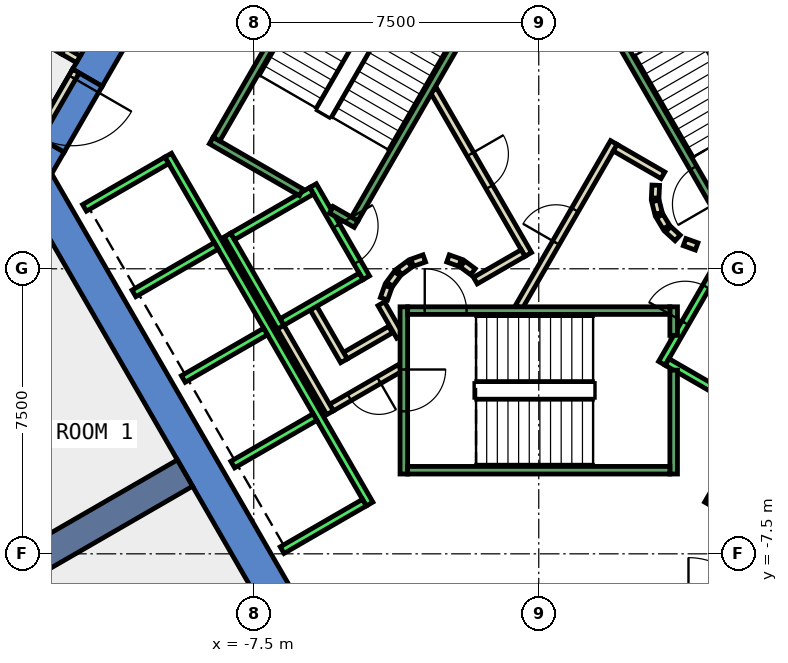
"""IFC4 building model, lengths in metres.
Left out: names, types, materials, properties, quantities, classifications, styles, units other than length and angle.
Written with IfcOpenShell. Run it as: python <this file> out.ifc"""

import sys

from ifc_helpers import new_model, si_unit, direction, frame, frame_2d, origin, place, context, subcontext, project, spatial, polyline, rectangle, outline, extrude, element, fill, save


model = new_model("IFC4")
c1 = context("Model", 3, precision=1e-05, world=origin(), true_north=direction((0.0, 1.0)))
c2 = subcontext(c1, "Body", "Model", "MODEL_VIEW")
j1 = project(units=[si_unit("LENGTHUNIT", "METRE"), si_unit("PLANEANGLEUNIT", "RADIAN")], contexts=[c1])
p1 = place(None, origin())
s1 = spatial("IfcSite", under=j1, at=p1, CompositionType="ELEMENT")
p2 = place(p1, origin())
s2 = spatial("IfcBuilding", under=s1, at=p2, CompositionType="ELEMENT")
p3 = place(p2, frame((0.0, 0.0, 90.8)))
s3 = spatial("IfcBuildingStorey", under=s2, at=p3, CompositionType="ELEMENT", Elevation=90.8)
p4 = place(p3, frame((0.0, 0.0, -0.4)))
e1 = element("IfcWall", 1, at=p4, inside=s3, PredefinedType="SHEAR", context=c2, shape_type="SweptSolid", body=[
    extrude(outline(polyline([(-12.267, 5.252), (-11.488, 4.802), (-6.409, 13.6), (-6.928, 14.5), (-12.267, 5.252)])), origin(), (0.0, 0.0, 1.0), 4.2),
])
p5 = place(p3, frame((0.0, 0.0, -0.4)))
e2 = element("IfcWall", 2, at=p5, inside=s3, PredefinedType="SHEAR", context=c2, shape_type="SweptSolid", body=[
    extrude(outline(polyline([(-12.488, 3.07), (-13.267, 3.52), (-13.856, 2.5), (-12.817, 2.5), (-12.488, 3.07)])), origin(), (0.0, 0.0, 1.0), 4.2),
])
p6 = place(p3, frame((0.0, 0.0, 3.6)))
e3 = element("IfcWall", 3, at=p6, inside=s3, PredefinedType="SHEAR", context=c2, shape_type="SweptSolid", body=[
    extrude(outline(polyline([(-13.267, 3.52), (-12.488, 3.07), (-11.488, 4.802), (-12.267, 5.252), (-13.267, 3.52)])), origin(), (0.0, 0.0, 1.0), 0.2),
])
p7 = place(p3, frame((0.0, 0.0, -0.4)))
e4 = element("IfcWall", 4, at=p7, inside=s3, PredefinedType="SHEAR", context=c2, shape_type="SweptSolid", body=[
    extrude(outline(polyline([(-13.856, 2.5), (-6.928, -9.5), (-6.409, -8.6), (-12.817, 2.5), (-13.856, 2.5)])), origin(), (0.0, 0.0, 1.0), 4.2),
])
p8 = place(p3, frame((-9.31, -5.375, -0.4), z_axis=(0.0, 0.0, 1.0), x_axis=(-0.866017533419, -0.500013631625, 0.0)))
e5 = element("IfcWall", 5, at=p8, inside=s3, PredefinedType="SHEAR", context=c2, shape_type="SweptSolid", body=[
    extrude(rectangle(XDim=9.0, YDim=0.8, at=frame_2d((4.5, 0.0))), origin(), (0.0, 0.0, 1.0), 4.2),
])
p9 = place(p3, frame((-15.098, 7.233, 0.0), z_axis=(0.0, 0.0, 1.0), x_axis=(0.866101363304, -0.499868411168, 0.0)))
e6 = element("IfcWall", 6, at=p9, inside=s3, PredefinedType="PARTITIONING", context=c2, shape_type="SweptSolid", body=[
    extrude(rectangle(XDim=2.992, YDim=0.2, at=frame_2d((1.496, 0.0))), origin(), (0.0, 0.0, 1.0), 3.8),
])
p10 = place(p3, frame((-3.9, -1.599, 0.0), z_axis=(0.0, 0.0, 1.0), x_axis=(-0.865969445389, -0.500096910261, 0.0)))
e7 = element("IfcWall", 7, at=p10, inside=s3, PredefinedType="PARTITIONING", context=c2, shape_type="SweptSolid", body=[
    extrude(rectangle(XDim=1.373, YDim=0.2, at=frame_2d((0.687, 0.0))), origin(), (0.0, 0.0, 1.0), 3.8),
])
p11 = place(p3, frame((-5.126, -2.422, 0.0), z_axis=(0.0, 0.0, 1.0), x_axis=(-0.500062241894, 0.865989465428, 0.0)))
e8 = element("IfcWall", 8, at=p11, inside=s3, PredefinedType="PARTITIONING", context=c2, shape_type="SweptSolid", body=[
    extrude(rectangle(XDim=1.7, YDim=0.2, at=frame_2d((0.85, 0.0))), origin(), (0.0, 0.0, 1.0), 3.8),
])
p12 = place(p3, frame((-3.65, -2.61, 0.0), z_axis=(0.0, 0.0, 1.0), x_axis=(-0.866072462134, -0.499918483688, 0.0)))
e9 = element("IfcWall", 9, at=p12, inside=s3, PredefinedType="PARTITIONING", context=c2, shape_type="SweptSolid", body=[
    extrude(rectangle(XDim=2.084, YDim=0.2, at=frame_2d((1.042, 0.0))), origin(), (0.0, 0.0, 1.0), 3.8),
])
p13 = place(p12, frame((0.642, 0.0, 0.0)))
e10 = element("IfcOpeningElement", 10, at=p13, cuts=e9, PredefinedType="OPENING", context=c2, shape_type="SweptSolid", body=[
    extrude(rectangle(XDim=0.9, YDim=2.1, at=frame_2d((0.45, 1.05))), frame((0.0, 0.11, 0.0), z_axis=(0.0, -1.0, 0.0), x_axis=(1.0, 0.0, 0.0)), (0.0, 0.0, 1.0), 0.22),
])
p14 = place(p3, frame((-5.492, -3.788, 0.0), z_axis=(0.0, 0.0, 1.0), x_axis=(-0.500008949224, 0.866020236886, 0.0)))
e11 = element("IfcWall", 11, at=p14, inside=s3, PredefinedType="PARTITIONING", context=c2, shape_type="SweptSolid", body=[
    extrude(rectangle(XDim=2.68, YDim=0.2, at=frame_2d((1.34, 0.0))), origin(), (0.0, 0.0, 1.0), 3.8),
])
p15 = place(p3, frame((-4.145, -0.92, 0.0), z_axis=(0.0, 0.0, 1.0), x_axis=(0.499743786207, -0.866173278362, 0.0)))
e12 = element("IfcWall", 12, at=p15, inside=s3, PredefinedType="PARTITIONING", context=c2, shape_type="SweptSolid", body=[
    extrude(rectangle(XDim=0.991, YDim=0.2, at=frame_2d((0.495, 0.0))), origin(), (0.0, 0.0, 1.0), 3.8),
])
p16 = place(p3, frame((-0.52, -1.0, 0.0), z_axis=(0.0, 0.0, 1.0), x_axis=(0.50011622646, 0.865958290007, 0.0)))
e13 = element("IfcWall", 13, at=p16, inside=s3, PredefinedType="PARTITIONING", context=c2, shape_type="SweptSolid", body=[
    extrude(rectangle(XDim=4.991, YDim=0.2, at=frame_2d((2.496, 0.0))), origin(), (0.0, 0.0, 1.0), 3.8),
])
p17 = place(p16, frame((1.945, 0.0, 0.0)))
e14 = element("IfcOpeningElement", 14, at=p17, cuts=e13, PredefinedType="OPENING", context=c2, shape_type="SweptSolid", body=[
    extrude(rectangle(XDim=1.0, YDim=2.1, at=frame_2d((0.5, 1.05))), frame((0.0, 0.11, 0.0), z_axis=(0.0, -1.0, 0.0), x_axis=(1.0, 0.0, 0.0)), (0.0, 0.0, 1.0), 0.22),
])
p18 = place(p3, frame((2.012, 3.186, 0.0), z_axis=(0.0, 0.0, 1.0), x_axis=(0.865891012941, -0.500232699559, 0.0)))
e15 = element("IfcWall", 15, at=p18, inside=s3, PredefinedType="PARTITIONING", context=c2, shape_type="SweptSolid", body=[
    extrude(rectangle(XDim=1.449, YDim=0.2, at=frame_2d((0.725, 0.0))), origin(), (0.0, 0.0, 1.0), 3.8),
])
p19 = place(p3, frame((3.079, 2.199, 0.0), z_axis=(0.0, 0.0, 1.0), x_axis=(-0.047771483479, -0.998858290933, 0.0)))
e16 = element("IfcWall", 16, at=p19, inside=s3, PredefinedType="PARTITIONING", context=c2, shape_type="SweptSolid", body=[
    extrude(rectangle(XDim=0.337, YDim=0.2, at=frame_2d((0.169, 0.0))), origin(), (0.0, 0.0, 1.0), 3.8),
])
p20 = place(p3, frame((3.07, 1.786, 0.0), z_axis=(0.0, 0.0, 1.0), x_axis=(0.242705583207, -0.970099994784, 0.0)))
e17 = element("IfcWall", 17, at=p20, inside=s3, PredefinedType="PARTITIONING", context=c2, shape_type="SweptSolid", body=[
    extrude(rectangle(XDim=0.338, YDim=0.2, at=frame_2d((0.169, 0.0))), origin(), (0.0, 0.0, 1.0), 3.8),
])
for number, where, z_axis, x_axis in (
    (18, (3.182, 1.388, 0.0), (0.0, 0.0, 1.0), (0.512, -0.859, 0.0)),
    (19, (3.404, 1.039, 0.0), (0.0, 0.0, 1.0), (0.74, -0.672, 0.0)),
):
    element("IfcWall", number, at=place(p3, frame(where, z_axis=z_axis, x_axis=x_axis)), inside=s3, PredefinedType="PARTITIONING", context=c2, shape_type="SweptSolid", body=[
        extrude(rectangle(XDim=0.338, YDim=0.2, at=frame_2d((0.169, 0.0))), origin(), (0.0, 0.0, 1.0), 3.8),
    ])
p21 = place(p3, frame((3.838, 0.702, 0.0), z_axis=(0.0, 0.0, 1.0), x_axis=(0.941035081519, -0.338308993895, 0.0)))
e20 = element("IfcWall", 20, at=p21, inside=s3, PredefinedType="PARTITIONING", context=c2, shape_type="SweptSolid", body=[
    extrude(rectangle(XDim=0.337, YDim=0.2, at=frame_2d((0.168, 0.0))), origin(), (0.0, 0.0, 1.0), 3.8),
])
p22 = place(p3, frame((-2.771, 4.7, 0.0), z_axis=(0.0, 0.0, 1.0), x_axis=(0.499969479948, -0.866043023828, 0.0)))
e21 = element("IfcWall", 21, at=p22, inside=s3, PredefinedType="PARTITIONING", context=c2, shape_type="SweptSolid", body=[
    extrude(rectangle(XDim=4.99, YDim=0.2, at=frame_2d((2.495, 0.0))), origin(), (0.0, 0.0, 1.0), 3.8),
])
p23 = place(p22, frame((1.945, 0.0, 0.0)))
e22 = element("IfcOpeningElement", 22, at=p23, cuts=e21, PredefinedType="OPENING", context=c2, shape_type="SweptSolid", body=[
    extrude(rectangle(XDim=1.0, YDim=2.1, at=frame_2d((0.5, 1.05))), frame((0.0, 0.11, 0.0), z_axis=(0.0, -1.0, 0.0), x_axis=(1.0, 0.0, 0.0)), (0.0, 0.0, 1.0), 0.22),
])
p24 = place(p3, frame((-0.412, 0.414, 0.0), z_axis=(0.0, 0.0, 1.0), x_axis=(-0.866017369001, -0.500013916395, 0.0)))
e23 = element("IfcWall", 23, at=p24, inside=s3, PredefinedType="PARTITIONING", context=c2, shape_type="SweptSolid", body=[
    extrude(rectangle(XDim=1.45, YDim=0.2, at=frame_2d((0.725, 0.0))), origin(), (0.0, 0.0, 1.0), 3.8),
])
p25 = place(p3, frame((-1.731, -0.077, 0.0), z_axis=(0.0, 0.0, 1.0), x_axis=(-0.804311165252, 0.594208338422, 0.0)))
e24 = element("IfcWall", 24, at=p25, inside=s3, PredefinedType="PARTITIONING", context=c2, shape_type="SweptSolid", body=[
    extrude(rectangle(XDim=0.338, YDim=0.2, at=frame_2d((0.169, 0.0))), origin(), (0.0, 0.0, 1.0), 3.8),
])
p26 = place(p3, frame((-2.07, 0.16, 0.0), z_axis=(0.0, 0.0, 1.0), x_axis=(-0.942199461132, 0.335052496547, 0.0)))
e25 = element("IfcWall", 25, at=p26, inside=s3, PredefinedType="PARTITIONING", context=c2, shape_type="SweptSolid", body=[
    extrude(rectangle(XDim=0.337, YDim=0.2, at=frame_2d((0.169, 0.0))), origin(), (0.0, 0.0, 1.0), 3.8),
])
p27 = place(p3, frame((-3.012, 0.273, 0.0), z_axis=(0.0, 0.0, 1.0), x_axis=(-0.942280615813, -0.334824194261, 0.0)))
e26 = element("IfcWall", 26, at=p27, inside=s3, PredefinedType="PARTITIONING", context=c2, shape_type="SweptSolid", body=[
    extrude(rectangle(XDim=0.338, YDim=0.2, at=frame_2d((0.169, 0.0))), origin(), (0.0, 0.0, 1.0), 3.8),
])
p28 = place(p3, frame((-3.397, 0.124, 0.0), z_axis=(0.0, 0.0, 1.0), x_axis=(-0.804311165252, -0.594208338422, 0.0)))
e27 = element("IfcWall", 27, at=p28, inside=s3, PredefinedType="PARTITIONING", context=c2, shape_type="SweptSolid", body=[
    extrude(rectangle(XDim=0.338, YDim=0.2, at=frame_2d((0.169, 0.0))), origin(), (0.0, 0.0, 1.0), 3.8),
])
p29 = place(p3, frame((-3.723, -0.131, 0.0), z_axis=(0.0, 0.0, 1.0), x_axis=(-0.594675113454, -0.803966112121, 0.0)))
e28 = element("IfcWall", 28, at=p29, inside=s3, PredefinedType="PARTITIONING", context=c2, shape_type="SweptSolid", body=[
    extrude(rectangle(XDim=0.338, YDim=0.2, at=frame_2d((0.169, 0.0))), origin(), (0.0, 0.0, 1.0), 3.8),
])
p30 = place(p3, frame((-3.96, -0.47, 0.0), z_axis=(0.0, 0.0, 1.0), x_axis=(-0.334824194261, -0.942280615813, 0.0)))
e29 = element("IfcWall", 29, at=p30, inside=s3, PredefinedType="PARTITIONING", context=c2, shape_type="SweptSolid", body=[
    extrude(rectangle(XDim=0.338, YDim=0.2, at=frame_2d((0.169, 0.0))), origin(), (0.0, 0.0, 1.0), 3.8),
])
p31 = place(p3, frame((-12.18, 5.202, 0.0), z_axis=(0.0, 0.0, 1.0), x_axis=(-0.50002537861, -0.866010750942, 0.0)))
e30 = element("IfcWall", 30, at=p31, inside=s3, PredefinedType="PARTITIONING", context=c2, shape_type="SweptSolid", body=[
    extrude(rectangle(XDim=2.0, YDim=0.2, at=frame_2d((1.0, 0.0))), origin(), (0.0, 0.0, 1.0), 2.4),
])
p32 = place(p31, frame((0.19, 0.0, 0.0)))
e31 = element("IfcOpeningElement", 31, at=p32, cuts=e30, PredefinedType="OPENING", context=c2, shape_type="SweptSolid", body=[
    extrude(rectangle(XDim=1.8, YDim=2.1, at=frame_2d((0.9, 1.05))), frame((0.0, 0.11, 0.0), z_axis=(0.0, -1.0, 0.0), x_axis=(1.0, 0.0, 0.0)), (0.0, 0.0, 1.0), 0.22),
])
p33 = place(p3, frame((-12.506, 5.737, 0.0), z_axis=(0.0, 0.0, 1.0), x_axis=(0.865624510465, -0.500693725627, 0.0)))
e32 = element("IfcWall", 32, at=p33, inside=s3, PredefinedType="PARTITIONING", context=c2, shape_type="SweptSolid", body=[
    extrude(rectangle(XDim=0.449, YDim=0.2, at=frame_2d((0.225, 0.0))), origin(), (0.0, 0.0, 1.0), 2.4),
])
p34 = place(p3, frame((-5.94, 2.188, 0.0), z_axis=(0.0, 0.0, 1.0), x_axis=(0.49994636267, -0.866056369097, 0.0)))
e33 = element("IfcWall", 33, at=p34, inside=s3, PredefinedType="STANDARD", context=c2, shape_type="SweptSolid", body=[
    extrude(rectangle(XDim=2.8, YDim=0.2, at=frame_2d((1.4, 0.0))), origin(), (0.0, 0.0, 1.0), 3.8),
])
p35 = place(p34, frame((1.225, 0.0, 0.0)))
e34 = element("IfcOpeningElement", 34, at=p35, cuts=e33, PredefinedType="OPENING", context=c2, shape_type="SweptSolid", body=[
    extrude(rectangle(XDim=1.1, YDim=2.1, at=frame_2d((0.55, 1.05))), frame((0.0, 0.11, 0.0), z_axis=(0.0, -1.0, 0.0), x_axis=(1.0, 0.0, 0.0)), (0.0, 0.0, 1.0), 0.22),
])
p36 = place(p3, frame((-8.192, 0.888, 0.0), z_axis=(0.0, 0.0, 1.0), x_axis=(0.49994636267, -0.866056369097, 0.0)))
e35 = element("IfcWall", 35, at=p36, inside=s3, PredefinedType="STANDARD", context=c2, shape_type="SweptSolid", body=[
    extrude(rectangle(XDim=2.8, YDim=0.2, at=frame_2d((1.4, 0.0))), origin(), (0.0, 0.0, 1.0), 3.8),
])
for number, where, z_axis, x_axis in (
    (36, (-5.977, 2.052, 0.0), (0.0, 0.0, 1.0), (-0.866, -0.5, 0.0)),
    (37, (-4.677, -0.2, 0.0), (0.0, 0.0, 1.0), (-0.866, -0.5, 0.0)),
):
    element("IfcWall", number, at=place(p3, frame(where, z_axis=z_axis, x_axis=x_axis)), inside=s3, PredefinedType="STANDARD", context=c2, shape_type="SweptSolid", body=[
        extrude(rectangle(XDim=2.399, YDim=0.2, at=frame_2d((1.2, 0.0))), origin(), (0.0, 0.0, 1.0), 3.8),
    ])
p37 = place(p3, frame((-9.751, 2.99, 0.0), z_axis=(0.0, 0.0, 1.0), x_axis=(0.50000090737, -0.866024879913, 0.0)))
e38 = element("IfcWall", 38, at=p37, inside=s3, PredefinedType="STANDARD", context=c2, shape_type="SweptSolid", body=[
    extrude(rectangle(XDim=10.6, YDim=0.2, at=frame_2d((5.3, 0.0))), origin(), (0.0, 0.0, 1.0), 3.8),
])
p38 = place(p3, frame((-9.788, 2.853, 0.0), z_axis=(0.0, 0.0, 1.0), x_axis=(-0.865998541277, -0.500046524342, 0.0)))
e39 = element("IfcWall", 39, at=p38, inside=s3, PredefinedType="STANDARD", context=c2, shape_type="SweptSolid", body=[
    extrude(rectangle(XDim=2.5, YDim=0.2, at=frame_2d((1.25, 0.0))), origin(), (0.0, 0.0, 1.0), 3.8),
])
for number, where, z_axis, x_axis in (
    (40, (-8.488, 0.602, 0.0), (0.0, 0.0, 1.0), (-0.866, -0.5, 0.0)),
    (41, (-7.188, -1.65, 0.0), (0.0, 0.0, 1.0), (-0.866, -0.5, 0.0)),
    (42, (-5.888, -3.902, 0.0), (0.0, 0.0, 1.0), (-0.866, -0.5, 0.0)),
    (43, (-4.588, -6.153, 0.0), (0.0, 0.0, 1.0), (-0.866, -0.5, 0.0)),
):
    element("IfcWall", number, at=place(p3, frame(where, z_axis=z_axis, x_axis=x_axis)), inside=s3, PredefinedType="STANDARD", context=c2, shape_type="SweptSolid", body=[
        extrude(rectangle(XDim=2.5, YDim=0.2, at=frame_2d((1.25, 0.0))), origin(), (0.0, 0.0, 1.0), 3.8),
    ])
p39 = place(p3, frame((3.24, -2.488, 0.0), z_axis=(0.0, 0.0, 1.0), x_axis=(0.49994636267, 0.866056369097, 0.0)))
e44 = element("IfcWall", 44, at=p39, inside=s3, PredefinedType="STANDARD", context=c2, shape_type="SweptSolid", body=[
    extrude(rectangle(XDim=2.8, YDim=0.2, at=frame_2d((1.4, 0.0))), origin(), (0.0, 0.0, 1.0), 3.8),
])
p40 = place(p39, frame((1.225, 0.0, 0.0)))
e45 = element("IfcOpeningElement", 45, at=p40, cuts=e44, PredefinedType="OPENING", context=c2, shape_type="SweptSolid", body=[
    extrude(rectangle(XDim=1.1, YDim=2.1, at=frame_2d((0.55, 1.05))), frame((0.0, 0.11, 0.0), z_axis=(0.0, -1.0, 0.0), x_axis=(1.0, 0.0, 0.0)), (0.0, 0.0, 1.0), 0.22),
])
p41 = place(p3, frame((3.377, -2.452, 0.0), z_axis=(0.0, 0.0, 1.0), x_axis=(0.865955154139, -0.50012165622, 0.0)))
e46 = element("IfcWall", 46, at=p41, inside=s3, PredefinedType="STANDARD", context=c2, shape_type="SweptSolid", body=[
    extrude(rectangle(XDim=2.4, YDim=0.2, at=frame_2d((1.2, 0.0))), origin(), (0.0, 0.0, 1.0), 3.8),
])
p42 = place(p3, frame((4.451, -6.19, 0.0), z_axis=(0.0, 0.0, 1.0), x_axis=(0.50000090737, 0.866024879913, 0.0)))
e47 = element("IfcWall", 47, at=p42, inside=s3, PredefinedType="STANDARD", context=c2, shape_type="SweptSolid", body=[
    extrude(rectangle(XDim=10.6, YDim=0.2, at=frame_2d((5.3, 0.0))), origin(), (0.0, 0.0, 1.0), 3.8),
])
p43 = place(p3, frame((-3.55, -1.0, 0.0), z_axis=(0.0, 0.0, 1.0), x_axis=(0.0, -1.0, 0.0)))
e48 = element("IfcWall", 48, at=p43, inside=s3, PredefinedType="STANDARD", context=c2, shape_type="SweptSolid", body=[
    extrude(rectangle(XDim=4.4, YDim=0.2, at=frame_2d((2.2, 0.0))), origin(), (0.0, 0.0, 1.0), 3.8),
])
p44 = place(p43, frame((1.65, 0.0, 0.0)))
e49 = element("IfcOpeningElement", 49, at=p44, cuts=e48, PredefinedType="OPENING", context=c2, shape_type="SweptSolid", body=[
    extrude(rectangle(XDim=1.1, YDim=2.2, at=frame_2d((0.55, 1.1))), frame((0.0, 0.11, 0.0), z_axis=(0.0, -1.0, 0.0), x_axis=(1.0, 0.0, 0.0)), (0.0, 0.0, 1.0), 0.22),
])
p45 = place(p3, frame((3.55, -2.667, 0.0), z_axis=(0.0, 0.0, 1.0), x_axis=(0.0, -1.0, 0.0)))
e50 = element("IfcWall", 50, at=p45, inside=s3, PredefinedType="STANDARD", context=c2, shape_type="SweptSolid", body=[
    extrude(rectangle(XDim=2.733, YDim=0.2, at=frame_2d((1.366, 0.0))), origin(), (0.0, 0.0, 1.0), 3.8),
])
p46 = place(p3, frame((3.55, -1.0, 0.0), z_axis=(0.0, 0.0, 1.0), x_axis=(0.0, -1.0, 0.0)))
e51 = element("IfcWall", 51, at=p46, inside=s3, PredefinedType="STANDARD", context=c2, shape_type="SweptSolid", body=[
    extrude(rectangle(XDim=0.751, YDim=0.2, at=frame_2d((0.375, 0.0))), origin(), (0.0, 0.0, 1.0), 3.8),
])
p47 = place(p3, frame((-3.45, -1.1, 0.0), z_axis=(0.0, 0.0, 1.0), x_axis=(1.0, 0.0, 0.0)))
e52 = element("IfcWall", 52, at=p47, inside=s3, PredefinedType="STANDARD", context=c2, shape_type="SweptSolid", body=[
    extrude(rectangle(XDim=6.9, YDim=0.2, at=frame_2d((3.45, 0.0))), origin(), (0.0, 0.0, 1.0), 3.8),
])
p48 = place(p47, frame((0.45, 0.0, 0.0)))
e53 = element("IfcOpeningElement", 53, at=p48, cuts=e52, PredefinedType="OPENING", context=c2, shape_type="SweptSolid", body=[
    extrude(rectangle(XDim=1.1, YDim=2.2, at=frame_2d((0.55, 1.1))), frame((0.0, 0.11, 0.0), z_axis=(0.0, -1.0, 0.0), x_axis=(1.0, 0.0, 0.0)), (0.0, 0.0, 1.0), 0.22),
])
p49 = place(p3, frame((-3.45, -5.3, 0.0), z_axis=(0.0, 0.0, 1.0), x_axis=(1.0, 0.0, 0.0)))
e54 = element("IfcWall", 54, at=p49, inside=s3, PredefinedType="STANDARD", context=c2, shape_type="SweptSolid", body=[
    extrude(rectangle(XDim=6.9, YDim=0.2, at=frame_2d((3.45, 0.0))), origin(), (0.0, 0.0, 1.0), 3.8),
])
p50 = place(p3, frame((4.843, 1.312, 0.0), z_axis=(0.0, 0.0, 1.0), x_axis=(-0.499963383562, 0.866046543262, 0.0)))
e55 = element("IfcWall", 55, at=p50, inside=s3, PredefinedType="STANDARD", context=c2, shape_type="SweptSolid", body=[
    extrude(rectangle(XDim=6.9, YDim=0.2, at=frame_2d((3.45, 0.0))), origin(), (0.0, 0.0, 1.0), 3.8),
])
p51 = place(p50, frame((0.45, 0.0, 0.0)))
e56 = element("IfcOpeningElement", 56, at=p51, cuts=e55, PredefinedType="OPENING", context=c2, shape_type="SweptSolid", body=[
    extrude(rectangle(XDim=1.1, YDim=2.2, at=frame_2d((0.55, 1.1))), frame((0.0, 0.11, 0.0), z_axis=(0.0, -1.0, 0.0), x_axis=(1.0, 0.0, 0.0)), (0.0, 0.0, 1.0), 0.22),
])
p52 = place(p3, frame((-6.25, 2.01, 0.0), z_axis=(0.0, 0.0, 1.0), x_axis=(-0.86611865017, 0.499838457731, 0.0)))
e57 = element("IfcWall", 57, at=p52, inside=s3, PredefinedType="STANDARD", context=c2, shape_type="SweptSolid", body=[
    extrude(rectangle(XDim=2.733, YDim=0.2, at=frame_2d((1.366, 0.0))), origin(), (0.0, 0.0, 1.0), 3.8),
])
p53 = place(p3, frame((-4.806, 1.176, 0.0), z_axis=(0.0, 0.0, 1.0), x_axis=(-0.866558586415, 0.499075361355, 0.0)))
e58 = element("IfcWall", 58, at=p53, inside=s3, PredefinedType="STANDARD", context=c2, shape_type="SweptSolid", body=[
    extrude(rectangle(XDim=0.751, YDim=0.2, at=frame_2d((0.376, 0.0))), origin(), (0.0, 0.0, 1.0), 3.8),
])
p54 = place(p3, frame((-1.393, 7.288, 0.0), z_axis=(0.0, 0.0, 1.0), x_axis=(-0.499963383562, -0.866046543262, 0.0)))
e59 = element("IfcWall", 59, at=p54, inside=s3, PredefinedType="STANDARD", context=c2, shape_type="SweptSolid", body=[
    extrude(rectangle(XDim=6.9, YDim=0.2, at=frame_2d((3.45, 0.0))), origin(), (0.0, 0.0, 1.0), 3.8),
])
p55 = place(p54, frame((0.45, 0.0, 0.0)))
e60 = element("IfcOpeningElement", 60, at=p55, cuts=e59, PredefinedType="OPENING", context=c2, shape_type="SweptSolid", body=[
    extrude(rectangle(XDim=1.1, YDim=2.2, at=frame_2d((0.55, 1.1))), frame((0.0, 0.11, 0.0), z_axis=(0.0, -1.0, 0.0), x_axis=(1.0, 0.0, 0.0)), (0.0, 0.0, 1.0), 0.22),
])
p56 = place(p3, frame((-5.03, 9.388, 0.0), z_axis=(0.0, 0.0, 1.0), x_axis=(-0.499978703459, -0.866037698999, 0.0)))
e61 = element("IfcWall", 61, at=p56, inside=s3, PredefinedType="STANDARD", context=c2, shape_type="SweptSolid", body=[
    extrude(rectangle(XDim=6.9, YDim=0.2, at=frame_2d((3.45, 0.0))), origin(), (0.0, 0.0, 1.0), 3.8),
])
p57 = place(p17, origin())
e62 = element("IfcDoor", 62, at=p57, inside=s3, OperationType="SINGLE_SWING_LEFT", PredefinedType="DOOR", context=c2, shape_type="SweptSolid", body=[
    extrude(rectangle(XDim=1.0, YDim=2.1, at=frame_2d((0.5, 1.05))), frame((0.0, 0.025, 0.0), z_axis=(0.0, -1.0, 0.0), x_axis=(1.0, 0.0, 0.0)), (0.0, 0.0, 1.0), 0.05),
])
fill(e14, e62)
p58 = place(p23, origin())
e63 = element("IfcDoor", 63, at=p58, inside=s3, OperationType="SINGLE_SWING_RIGHT", PredefinedType="DOOR", context=c2, shape_type="SweptSolid", body=[
    extrude(rectangle(XDim=1.0, YDim=2.1, at=frame_2d((0.5, 1.05))), frame((0.0, 0.025, 0.0), z_axis=(0.0, -1.0, 0.0), x_axis=(1.0, 0.0, 0.0)), (0.0, 0.0, 1.0), 0.05),
])
fill(e22, e63)
p59 = place(p13, origin())
e64 = element("IfcDoor", 64, at=p59, inside=s3, OperationType="SINGLE_SWING_LEFT", PredefinedType="DOOR", context=c2, shape_type="SweptSolid", body=[
    extrude(rectangle(XDim=0.9, YDim=2.1, at=frame_2d((0.45, 1.05))), frame((0.0, 0.025, 0.0), z_axis=(0.0, -1.0, 0.0), x_axis=(1.0, 0.0, 0.0)), (0.0, 0.0, 1.0), 0.05),
])
fill(e10, e64)
p60 = place(p32, origin())
e65 = element("IfcDoor", 65, at=p60, inside=s3, OperationType="DOUBLE_DOOR_SINGLE_SWING", PredefinedType="DOOR", context=c2, shape_type="SweptSolid", body=[
    extrude(rectangle(XDim=1.8, YDim=2.1, at=frame_2d((0.9, 1.05))), frame((0.0, 0.025, 0.0), z_axis=(0.0, -1.0, 0.0), x_axis=(1.0, 0.0, 0.0)), (0.0, 0.0, 1.0), 0.05),
])
fill(e31, e65)
p61 = place(p40, origin())
e66 = element("IfcDoor", 66, at=p61, inside=s3, OperationType="SLIDING_TO_LEFT", PredefinedType="DOOR", context=c2, shape_type="SweptSolid", body=[
    extrude(rectangle(XDim=1.1, YDim=2.1, at=frame_2d((0.55, 1.05))), frame((0.0, 0.025, 0.0), z_axis=(0.0, -1.0, 0.0), x_axis=(1.0, 0.0, 0.0)), (0.0, 0.0, 1.0), 0.05),
])
fill(e45, e66)
p62 = place(p35, origin())
e67 = element("IfcDoor", 67, at=p62, inside=s3, OperationType="SLIDING_TO_LEFT", PredefinedType="DOOR", context=c2, shape_type="SweptSolid", body=[
    extrude(rectangle(XDim=1.1, YDim=2.1, at=frame_2d((0.55, 1.05))), frame((0.0, 0.025, 0.0), z_axis=(0.0, -1.0, 0.0), x_axis=(1.0, 0.0, 0.0)), (0.0, 0.0, 1.0), 0.05),
])
fill(e34, e67)
p63 = place(p48, origin())
e68 = element("IfcDoor", 68, at=p63, inside=s3, OperationType="SINGLE_SWING_LEFT", PredefinedType="DOOR", context=c2, shape_type="SweptSolid", body=[
    extrude(rectangle(XDim=1.1, YDim=2.2, at=frame_2d((0.55, 1.1))), frame((0.0, 0.025, 0.0), z_axis=(0.0, -1.0, 0.0), x_axis=(1.0, 0.0, 0.0)), (0.0, 0.0, 1.0), 0.05),
])
fill(e53, e68)
p64 = place(p44, origin())
e69 = element("IfcDoor", 69, at=p64, inside=s3, OperationType="SINGLE_SWING_LEFT", PredefinedType="DOOR", context=c2, shape_type="SweptSolid", body=[
    extrude(rectangle(XDim=1.1, YDim=2.2, at=frame_2d((0.55, 1.1))), frame((0.0, 0.025, 0.0), z_axis=(0.0, -1.0, 0.0), x_axis=(1.0, 0.0, 0.0)), (0.0, 0.0, 1.0), 0.05),
])
fill(e49, e69)
p65 = place(p51, origin())
e70 = element("IfcDoor", 70, at=p65, inside=s3, OperationType="SINGLE_SWING_LEFT", PredefinedType="DOOR", context=c2, shape_type="SweptSolid", body=[
    extrude(rectangle(XDim=1.1, YDim=2.2, at=frame_2d((0.55, 1.1))), frame((0.0, 0.025, 0.0), z_axis=(0.0, -1.0, 0.0), x_axis=(1.0, 0.0, 0.0)), (0.0, 0.0, 1.0), 0.05),
])
fill(e56, e70)
save(model, sys.argv[1])
